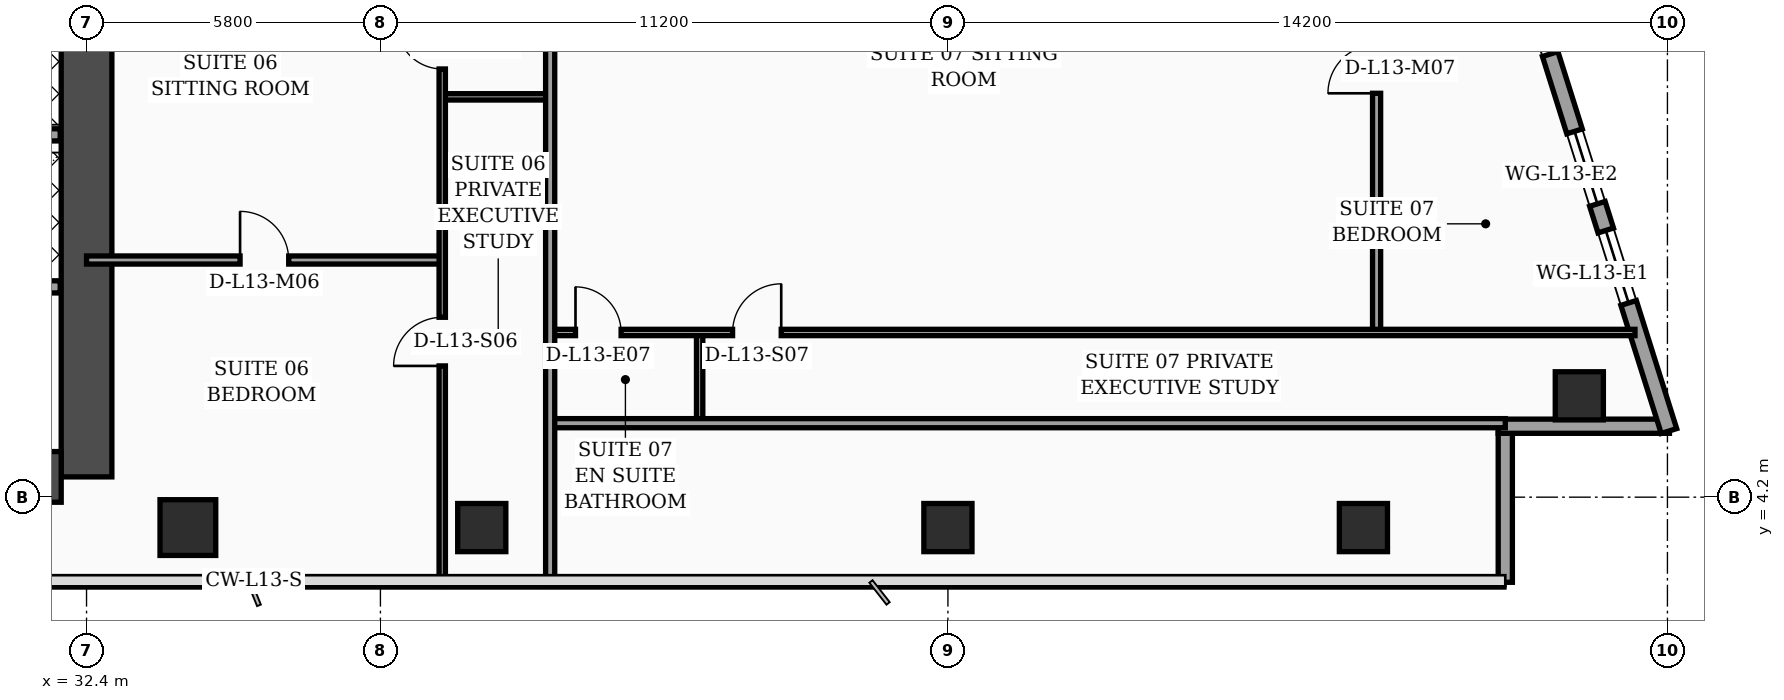
"""IFC4 building model, lengths in metres.
Left out: names, types, materials, properties, quantities, classifications, styles, units other than length and angle.
Written with IfcOpenShell. Run it as: python <this file> out.ifc"""

import sys

from ifc_helpers import new_model, si_unit, direction, frame, frame_2d, origin, origin_2d, place, context, subcontext, project, spatial, rectangle, hollow_rectangle, extrude, element, fill, save


model = new_model("IFC4")
c1 = context("Model", 3, precision=1e-05, world=origin(), true_north=direction((0.0, 1.0)))
c2 = subcontext(c1, "Body", "Model", "MODEL_VIEW")
j1 = project(units=[si_unit("LENGTHUNIT", "METRE"), si_unit("PLANEANGLEUNIT", "RADIAN")], contexts=[c1])
p1 = place(None, origin())
s1 = spatial("IfcSite", under=j1, at=p1, CompositionType="ELEMENT")
p2 = place(p1, origin())
s2 = spatial("IfcBuilding", under=s1, at=p2, CompositionType="ELEMENT")
p3 = place(p2, frame((0.0, 0.0, 58.4)))
s3 = spatial("IfcBuildingStorey", under=s2, at=p3, CompositionType="ELEMENT", Elevation=58.4)
p4 = place(p3, frame((32.4, 4.6, 0.0), z_axis=(0.0, 0.0, 1.0), x_axis=(0.0, 1.0, 0.0)))
e1 = element("IfcWall", 1, at=p4, inside=s3, PredefinedType="SHEAR", context=c2, shape_type="SweptSolid", body=[
    extrude(rectangle(XDim=10.4, YDim=1.0, at=frame_2d((5.2, 0.0))), origin(), (0.0, 0.0, 1.0), 3.56),
])
p5 = place(p3, frame((22.1, 4.6, 0.0), z_axis=(0.0, 0.0, 1.0), x_axis=(1.0, 0.0, 0.0)))
e2 = element("IfcWall", 2, at=p5, inside=s3, PredefinedType="SHEAR", context=c2, shape_type="SweptSolid", body=[
    extrude(rectangle(XDim=9.8, YDim=1.0, at=frame_2d((4.9, 0.0))), origin(), (0.0, 0.0, 1.0), 3.56),
])
p6 = place(p3, frame((34.4, 3.6, 0.0), z_axis=(0.0, 0.0, 1.0), x_axis=(1.0, 0.0, 0.0)))
e3 = element("IfcColumn", 3, at=p6, inside=s3, PredefinedType="COLUMN", context=c2, shape_type="SweptSolid", body=[
    extrude(hollow_rectangle(XDim=1.1, YDim=1.1, WallThickness=0.045, at=origin_2d()), origin(), (0.0, 0.0, 1.0), 3.56),
])
for number, where, z_axis, x_axis in (
    (4, (40.2, 3.6, 0.0), (0.0, 0.0, 1.0), (1.0, 0.0, 0.0)),
    (5, (49.4, 3.6, 0.0), (0.0, 0.0, 1.0), (1.0, 0.0, 0.0)),
    (6, (57.6, 3.6, 0.0), (0.0, 0.0, 1.0), (1.0, 0.0, 0.0)),
    (7, (61.861, 6.2, 0.0), (0.0, 0.0, 1.0), (1.0, 0.0, 0.0)),
):
    element("IfcColumn", number, at=place(p3, frame(where, z_axis=z_axis, x_axis=x_axis)), inside=s3, PredefinedType="COLUMN", context=c2, shape_type="SweptSolid", body=[
        extrude(hollow_rectangle(XDim=0.95, YDim=0.95, WallThickness=0.04, at=origin_2d()), origin(), (0.0, 0.0, 1.0), 3.56),
    ])
p7 = place(p3, frame((60.4, 2.52, 0.0), z_axis=(0.0, 0.0, 1.0), x_axis=(0.0, 1.0, 0.0)))
e8 = element("IfcWall", 8, at=p7, inside=s3, PredefinedType="SOLIDWALL", context=c2, shape_type="SweptSolid", body=[
    extrude(rectangle(XDim=2.94, YDim=0.28, at=frame_2d((1.47, 0.0))), origin(), (0.0, 0.0, 1.0), 3.04),
])
p8 = place(p3, frame((60.26, 5.6, 0.0), z_axis=(0.0, 0.0, 1.0), x_axis=(1.0, 0.0, 0.0)))
e9 = element("IfcWall", 9, at=p8, inside=s3, PredefinedType="SOLIDWALL", context=c2, shape_type="SweptSolid", body=[
    extrude(rectangle(XDim=3.38, YDim=0.28, at=frame_2d((1.69, 0.0))), origin(), (0.0, 0.0, 1.0), 3.04),
])
p9 = place(p3, frame((63.63, 5.505, 0.0), z_axis=(0.0, 0.0, 1.0), x_axis=(-0.300501856448, 0.953781229775, 0.0)))
e10 = element("IfcWall", 10, at=p9, inside=s3, PredefinedType="SOLIDWALL", context=c2, shape_type="SweptSolid", body=[
    extrude(rectangle(XDim=30.814, YDim=0.32, at=frame_2d((15.407, 0.0))), origin(), (0.0, 0.0, 1.0), 3.56),
])
p10 = place(p9, frame((10.199, 0.0, 0.0)))
e11 = element("IfcOpeningElement", 11, at=p10, cuts=e10, PredefinedType="OPENING", context=c2, shape_type="SweptSolid", body=[
    extrude(rectangle(XDim=1.4, YDim=2.25, at=frame_2d((0.7, 1.125))), frame((0.0, 0.17, 0.0), z_axis=(0.0, -1.0, 0.0), x_axis=(1.0, 0.0, 0.0)), (0.0, 0.0, 1.0), 0.34),
])
p11 = place(p9, frame((2.65, 0.0, 0.75)))
e12 = element("IfcOpeningElement", 12, at=p11, cuts=e10, PredefinedType="OPENING", context=c2, shape_type="SweptSolid", body=[
    extrude(rectangle(XDim=1.5, YDim=1.6, at=frame_2d((0.75, 0.8))), frame((0.0, 0.17, 0.0), z_axis=(0.0, -1.0, 0.0), x_axis=(1.0, 0.0, 0.0)), (0.0, 0.0, 1.0), 0.34),
])
p12 = place(p9, frame((4.7, 0.0, 0.75)))
e13 = element("IfcOpeningElement", 13, at=p12, cuts=e10, PredefinedType="OPENING", context=c2, shape_type="SweptSolid", body=[
    extrude(rectangle(XDim=1.5, YDim=1.6, at=frame_2d((0.75, 0.8))), frame((0.0, 0.17, 0.0), z_axis=(0.0, -1.0, 0.0), x_axis=(1.0, 0.0, 0.0)), (0.0, 0.0, 1.0), 0.34),
])
p13 = place(p9, frame((7.8, 0.0, 0.75)))
e14 = element("IfcOpeningElement", 14, at=p13, cuts=e10, PredefinedType="OPENING", context=c2, shape_type="SweptSolid", body=[
    extrude(rectangle(XDim=1.5, YDim=1.6, at=frame_2d((0.75, 0.8))), frame((0.0, 0.17, 0.0), z_axis=(0.0, -1.0, 0.0), x_axis=(1.0, 0.0, 0.0)), (0.0, 0.0, 1.0), 0.34),
])
p14 = place(p9, frame((14.0, 0.0, 0.75)))
e15 = element("IfcOpeningElement", 15, at=p14, cuts=e10, PredefinedType="OPENING", context=c2, shape_type="SweptSolid", body=[
    extrude(rectangle(XDim=1.5, YDim=1.6, at=frame_2d((0.75, 0.8))), frame((0.0, 0.17, 0.0), z_axis=(0.0, -1.0, 0.0), x_axis=(1.0, 0.0, 0.0)), (0.0, 0.0, 1.0), 0.34),
])
p15 = place(p9, frame((17.1, 0.0, 0.75)))
e16 = element("IfcOpeningElement", 16, at=p15, cuts=e10, PredefinedType="OPENING", context=c2, shape_type="SweptSolid", body=[
    extrude(rectangle(XDim=1.5, YDim=1.6, at=frame_2d((0.75, 0.8))), frame((0.0, 0.17, 0.0), z_axis=(0.0, -1.0, 0.0), x_axis=(1.0, 0.0, 0.0)), (0.0, 0.0, 1.0), 0.34),
])
p16 = place(p9, frame((23.3, 0.0, 0.75)))
e17 = element("IfcOpeningElement", 17, at=p16, cuts=e10, PredefinedType="OPENING", context=c2, shape_type="SweptSolid", body=[
    extrude(rectangle(XDim=1.5, YDim=1.6, at=frame_2d((0.75, 0.8))), frame((0.0, 0.17, 0.0), z_axis=(0.0, -1.0, 0.0), x_axis=(1.0, 0.0, 0.0)), (0.0, 0.0, 1.0), 0.34),
])
p17 = place(p9, frame((27.45, 0.0, 0.75)))
e18 = element("IfcOpeningElement", 18, at=p17, cuts=e10, PredefinedType="OPENING", context=c2, shape_type="SweptSolid", body=[
    extrude(rectangle(XDim=1.5, YDim=1.6, at=frame_2d((0.75, 0.8))), frame((0.0, 0.17, 0.0), z_axis=(0.0, -1.0, 0.0), x_axis=(1.0, 0.0, 0.0)), (0.0, 0.0, 1.0), 0.34),
])
p18 = place(p3, frame((27.02, 11.35, 0.0), z_axis=(0.0, 0.0, 1.0), x_axis=(1.0, 0.0, 0.0)))
e19 = element("IfcWall", 19, at=p18, inside=s3, PredefinedType="SOLIDWALL", context=c2, shape_type="SweptSolid", body=[
    extrude(rectangle(XDim=4.86, YDim=0.24, at=frame_2d((2.43, 0.0))), origin(), (0.0, 0.0, 1.0), 3.56),
])
p19 = place(p18, frame((0.45, 0.0, 0.0)))
e20 = element("IfcOpeningElement", 20, at=p19, cuts=e19, PredefinedType="OPENING", context=c2, shape_type="SweptSolid", body=[
    extrude(rectangle(XDim=1.3, YDim=2.35, at=frame_2d((0.65, 1.175))), frame((0.0, 0.13, 0.0), z_axis=(0.0, -1.0, 0.0), x_axis=(1.0, 0.0, 0.0)), (0.0, 0.0, 1.0), 0.26),
])
p20 = place(p3, frame((27.02, 8.35, 0.0), z_axis=(0.0, 0.0, 1.0), x_axis=(1.0, 0.0, 0.0)))
e21 = element("IfcWall", 21, at=p20, inside=s3, PredefinedType="SOLIDWALL", context=c2, shape_type="SweptSolid", body=[
    extrude(rectangle(XDim=4.86, YDim=0.24, at=frame_2d((2.43, 0.0))), origin(), (0.0, 0.0, 1.0), 3.56),
])
p21 = place(p3, frame((39.42, 12.1, 0.0), z_axis=(0.0, 0.0, 1.0), x_axis=(1.0, 0.0, 0.0)))
e22 = element("IfcWall", 22, at=p21, inside=s3, PredefinedType="PARTITIONING", context=c2, shape_type="SweptSolid", body=[
    extrude(rectangle(XDim=2.13, YDim=0.125, at=frame_2d((1.065, 0.0))), origin(), (0.0, 0.0, 1.0), 3.56),
])
p22 = place(p3, frame((32.4, 8.88, 0.0), z_axis=(0.0, 0.0, 1.0), x_axis=(1.0, 0.0, 0.0)))
e23 = element("IfcWall", 23, at=p22, inside=s3, PredefinedType="PARTITIONING", context=c2, shape_type="SweptSolid", body=[
    extrude(rectangle(XDim=7.02, YDim=0.16, at=frame_2d((3.51, 0.0))), origin(), (0.0, 0.0, 1.0), 2.84),
])
p23 = place(p22, frame((3.03, 0.0, 0.0)))
e24 = element("IfcOpeningElement", 24, at=p23, cuts=e23, PredefinedType="OPENING", context=c2, shape_type="SweptSolid", body=[
    extrude(rectangle(XDim=0.96, YDim=2.2, at=frame_2d((0.48, 1.1))), frame((0.0, 0.09, 0.0), z_axis=(0.0, -1.0, 0.0), x_axis=(1.0, 0.0, 0.0)), (0.0, 0.0, 1.0), 0.18),
])
p24 = place(p3, frame((39.42, 2.44, 0.0), z_axis=(0.0, 0.0, 1.0), x_axis=(0.0, 1.0, 0.0)))
e25 = element("IfcWall", 25, at=p24, inside=s3, PredefinedType="PARTITIONING", context=c2, shape_type="SweptSolid", body=[
    extrude(rectangle(XDim=12.71, YDim=0.125, at=frame_2d((6.355, 0.0))), origin(), (0.0, 0.0, 1.0), 2.84),
])
p25 = place(p24, frame((4.35, 0.0, 0.0)))
e26 = element("IfcOpeningElement", 26, at=p25, cuts=e25, PredefinedType="OPENING", context=c2, shape_type="SweptSolid", body=[
    extrude(rectangle(XDim=0.96, YDim=2.2, at=frame_2d((0.48, 1.1))), frame((0.0, 0.073, 0.0), z_axis=(0.0, -1.0, 0.0), x_axis=(1.0, 0.0, 0.0)), (0.0, 0.0, 1.0), 0.145),
])
p26 = place(p24, frame((10.21, 0.0, 0.0)))
e27 = element("IfcOpeningElement", 27, at=p26, cuts=e25, PredefinedType="OPENING", context=c2, shape_type="SweptSolid", body=[
    extrude(rectangle(XDim=0.9, YDim=2.15, at=frame_2d((0.45, 1.075))), frame((0.0, 0.073, 0.0), z_axis=(0.0, -1.0, 0.0), x_axis=(1.0, 0.0, 0.0)), (0.0, 0.0, 1.0), 0.145),
])
p27 = place(p3, frame((44.5, 5.66, 0.0), z_axis=(0.0, 0.0, 1.0), x_axis=(0.0, 1.0, 0.0)))
e28 = element("IfcWall", 28, at=p27, inside=s3, PredefinedType="PARTITIONING", context=c2, shape_type="SweptSolid", body=[
    extrude(rectangle(XDim=1.79, YDim=0.125, at=frame_2d((0.895, 0.0))), origin(), (0.0, 0.0, 1.0), 3.56),
])
p28 = place(p3, frame((57.86, 7.45, 0.0), z_axis=(0.0, 0.0, 1.0), x_axis=(0.0, 1.0, 0.0)))
e29 = element("IfcWall", 29, at=p28, inside=s3, PredefinedType="PARTITIONING", context=c2, shape_type="SweptSolid", body=[
    extrude(rectangle(XDim=10.4, YDim=0.16, at=frame_2d((5.2, 0.0))), origin(), (0.0, 0.0, 1.0), 3.04),
])
p29 = place(p28, frame((4.72, 0.0, 0.0)))
e30 = element("IfcOpeningElement", 30, at=p29, cuts=e29, PredefinedType="OPENING", context=c2, shape_type="SweptSolid", body=[
    extrude(rectangle(XDim=0.96, YDim=2.2, at=frame_2d((0.48, 1.1))), frame((0.0, 0.09, 0.0), z_axis=(0.0, -1.0, 0.0), x_axis=(1.0, 0.0, 0.0)), (0.0, 0.0, 1.0), 0.18),
])
p30 = place(p3, frame((41.55, 7.45, 0.0), z_axis=(0.0, 0.0, 1.0), x_axis=(1.0, 0.0, 0.0)))
e31 = element("IfcWall", 31, at=p30, inside=s3, PredefinedType="PARTITIONING", context=c2, shape_type="SweptSolid", body=[
    extrude(rectangle(XDim=21.41, YDim=0.125, at=frame_2d((10.705, 0.0))), origin(), (0.0, 0.0, 1.0), 2.84),
])
p31 = place(p30, frame((0.5, 0.0, 0.0)))
e32 = element("IfcOpeningElement", 32, at=p31, cuts=e31, PredefinedType="OPENING", context=c2, shape_type="SweptSolid", body=[
    extrude(rectangle(XDim=0.9, YDim=2.15, at=frame_2d((0.45, 1.075))), frame((0.0, 0.073, 0.0), z_axis=(0.0, -1.0, 0.0), x_axis=(1.0, 0.0, 0.0)), (0.0, 0.0, 1.0), 0.145),
])
p32 = place(p30, frame((3.6, 0.0, 0.0)))
e33 = element("IfcOpeningElement", 33, at=p32, cuts=e31, PredefinedType="OPENING", context=c2, shape_type="SweptSolid", body=[
    extrude(rectangle(XDim=0.96, YDim=2.2, at=frame_2d((0.48, 1.1))), frame((0.0, 0.073, 0.0), z_axis=(0.0, -1.0, 0.0), x_axis=(1.0, 0.0, 0.0)), (0.0, 0.0, 1.0), 0.145),
])
p33 = place(p3, frame((41.55, 5.66, 0.0), z_axis=(0.0, 0.0, 1.0), x_axis=(1.0, 0.0, 0.0)))
e34 = element("IfcWall", 34, at=p33, inside=s3, PredefinedType="PARTITIONING", context=c2, shape_type="SweptSolid", body=[
    extrude(rectangle(XDim=18.85, YDim=0.18, at=frame_2d((9.425, 0.0))), origin(), (0.0, 0.0, 1.0), 2.84),
])
p34 = place(p3, frame((41.55, 2.44, 0.0), z_axis=(0.0, 0.0, 1.0), x_axis=(0.0, 1.0, 0.0)))
e35 = element("IfcWall", 35, at=p34, inside=s3, PredefinedType="PARTITIONING", context=c2, shape_type="SweptSolid", body=[
    extrude(rectangle(XDim=31.04, YDim=0.18, at=frame_2d((15.52, 0.0))), origin(), (0.0, 0.0, 1.0), 2.84),
])
p35 = place(p34, frame((13.51, 0.0, 0.0)))
e36 = element("IfcOpeningElement", 36, at=p35, cuts=e35, PredefinedType="OPENING", context=c2, shape_type="SweptSolid", body=[
    extrude(rectangle(XDim=1.02, YDim=2.2, at=frame_2d((0.51, 1.1))), frame((0.0, 0.1, 0.0), z_axis=(0.0, -1.0, 0.0), x_axis=(1.0, 0.0, 0.0)), (0.0, 0.0, 1.0), 0.2),
])
p36 = place(p34, frame((17.77, 0.0, 0.0)))
e37 = element("IfcOpeningElement", 37, at=p36, cuts=e35, PredefinedType="OPENING", context=c2, shape_type="SweptSolid", body=[
    extrude(rectangle(XDim=1.02, YDim=2.2, at=frame_2d((0.51, 1.1))), frame((0.0, 0.1, 0.0), z_axis=(0.0, -1.0, 0.0), x_axis=(1.0, 0.0, 0.0)), (0.0, 0.0, 1.0), 0.2),
])
p37 = place(p34, frame((25.58, 0.0, 0.0)))
e38 = element("IfcOpeningElement", 38, at=p37, cuts=e35, PredefinedType="OPENING", context=c2, shape_type="SweptSolid", body=[
    extrude(rectangle(XDim=1.02, YDim=2.2, at=frame_2d((0.51, 1.1))), frame((0.0, 0.1, 0.0), z_axis=(0.0, -1.0, 0.0), x_axis=(1.0, 0.0, 0.0)), (0.0, 0.0, 1.0), 0.2),
])
p38 = place(p11, origin())
e39 = element("IfcWindow", 39, at=p38, inside=s3, PartitioningType="SINGLE_PANEL", PredefinedType="WINDOW", context=c2, shape_type="SweptSolid", body=[
    extrude(rectangle(XDim=1.5, YDim=1.6, at=frame_2d((0.75, 0.8))), frame((0.0, 0.03, 0.0), z_axis=(0.0, -1.0, 0.0), x_axis=(1.0, 0.0, 0.0)), (0.0, 0.0, 1.0), 0.06),
])
fill(e12, e39)
p39 = place(p12, origin())
e40 = element("IfcWindow", 40, at=p39, inside=s3, PartitioningType="SINGLE_PANEL", PredefinedType="WINDOW", context=c2, shape_type="SweptSolid", body=[
    extrude(rectangle(XDim=1.5, YDim=1.6, at=frame_2d((0.75, 0.8))), frame((0.0, 0.03, 0.0), z_axis=(0.0, -1.0, 0.0), x_axis=(1.0, 0.0, 0.0)), (0.0, 0.0, 1.0), 0.06),
])
fill(e13, e40)
p40 = place(p13, origin())
e41 = element("IfcWindow", 41, at=p40, inside=s3, PartitioningType="SINGLE_PANEL", PredefinedType="WINDOW", context=c2, shape_type="SweptSolid", body=[
    extrude(rectangle(XDim=1.5, YDim=1.6, at=frame_2d((0.75, 0.8))), frame((0.0, 0.03, 0.0), z_axis=(0.0, -1.0, 0.0), x_axis=(1.0, 0.0, 0.0)), (0.0, 0.0, 1.0), 0.06),
])
fill(e14, e41)
p41 = place(p23, origin())
e42 = element("IfcDoor", 42, at=p41, inside=s3, OperationType="SINGLE_SWING_LEFT", PredefinedType="DOOR", context=c2, shape_type="SweptSolid", body=[
    extrude(rectangle(XDim=0.96, YDim=2.2, at=frame_2d((0.48, 1.1))), frame((0.0, 0.025, 0.0), z_axis=(0.0, -1.0, 0.0), x_axis=(1.0, 0.0, 0.0)), (0.0, 0.0, 1.0), 0.05),
])
fill(e24, e42)
p42 = place(p25, origin())
e43 = element("IfcDoor", 43, at=p42, inside=s3, OperationType="SINGLE_SWING_LEFT", PredefinedType="DOOR", context=c2, shape_type="SweptSolid", body=[
    extrude(rectangle(XDim=0.96, YDim=2.2, at=frame_2d((0.48, 1.1))), frame((0.0, 0.025, 0.0), z_axis=(0.0, -1.0, 0.0), x_axis=(1.0, 0.0, 0.0)), (0.0, 0.0, 1.0), 0.05),
])
fill(e26, e43)
p43 = place(p26, origin())
e44 = element("IfcDoor", 44, at=p43, inside=s3, OperationType="SINGLE_SWING_RIGHT", PredefinedType="DOOR", context=c2, shape_type="SweptSolid", body=[
    extrude(rectangle(XDim=0.9, YDim=2.15, at=frame_2d((0.45, 1.075))), frame((0.0, 0.025, 0.0), z_axis=(0.0, -1.0, 0.0), x_axis=(1.0, 0.0, 0.0)), (0.0, 0.0, 1.0), 0.05),
])
fill(e27, e44)
p44 = place(p29, origin())
e45 = element("IfcDoor", 45, at=p44, inside=s3, OperationType="SINGLE_SWING_LEFT", PredefinedType="DOOR", context=c2, shape_type="SweptSolid", body=[
    extrude(rectangle(XDim=0.96, YDim=2.2, at=frame_2d((0.48, 1.1))), frame((0.0, 0.025, 0.0), z_axis=(0.0, -1.0, 0.0), x_axis=(1.0, 0.0, 0.0)), (0.0, 0.0, 1.0), 0.05),
])
fill(e30, e45)
p45 = place(p31, origin())
e46 = element("IfcDoor", 46, at=p45, inside=s3, OperationType="SINGLE_SWING_LEFT", PredefinedType="DOOR", context=c2, shape_type="SweptSolid", body=[
    extrude(rectangle(XDim=0.9, YDim=2.15, at=frame_2d((0.45, 1.075))), frame((0.0, 0.025, 0.0), z_axis=(0.0, -1.0, 0.0), x_axis=(1.0, 0.0, 0.0)), (0.0, 0.0, 1.0), 0.05),
])
fill(e32, e46)
p46 = place(p32, origin())
e47 = element("IfcDoor", 47, at=p46, inside=s3, OperationType="SINGLE_SWING_RIGHT", PredefinedType="DOOR", context=c2, shape_type="SweptSolid", body=[
    extrude(rectangle(XDim=0.96, YDim=2.2, at=frame_2d((0.48, 1.1))), frame((0.0, 0.025, 0.0), z_axis=(0.0, -1.0, 0.0), x_axis=(1.0, 0.0, 0.0)), (0.0, 0.0, 1.0), 0.05),
])
fill(e33, e47)
save(model, sys.argv[1])
